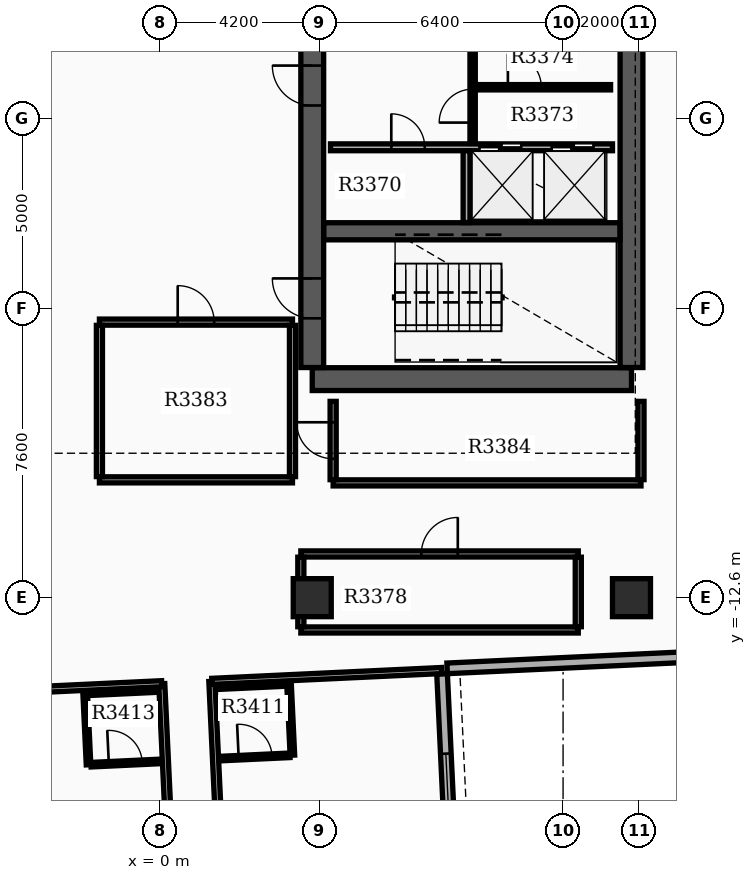
"""IFC4 building model, lengths in metres.
Left out: names, types, materials, properties, quantities, classifications, styles, units other than length and angle.
Written with IfcOpenShell. Run it as: python <this file> out.ifc"""

import sys

from ifc_helpers import new_model, si_unit, direction, frame, frame_2d, origin, origin_2d, place, context, subcontext, project, spatial, rectangle, extrude, element, fill, save


model = new_model("IFC4")
c1 = context("Model", 3, precision=1e-05, world=origin(), true_north=direction((0.0, 1.0)))
c2 = subcontext(c1, "Body", "Model", "MODEL_VIEW")
j1 = project(units=[si_unit("LENGTHUNIT", "METRE"), si_unit("PLANEANGLEUNIT", "RADIAN")], contexts=[c1])
p1 = place(None, origin())
s1 = spatial("IfcSite", under=j1, at=p1, CompositionType="ELEMENT")
p2 = place(p1, origin())
s2 = spatial("IfcBuilding", under=s1, at=p2, CompositionType="ELEMENT")
p3 = place(p2, frame((0.0, 0.0, 213.0)))
s3 = spatial("IfcBuildingStorey", under=s2, at=p3, CompositionType="ELEMENT", Elevation=213.0)
p4 = place(p3, frame((4.0, -6.85, 0.0), z_axis=(0.0, 0.0, 1.0), x_axis=(1.0, 0.0, 0.0)))
e1 = element("IfcWall", 1, at=p4, inside=s3, PredefinedType="SHEAR", context=c2, shape_type="SweptSolid", body=[
    extrude(rectangle(XDim=8.4, YDim=0.6, at=frame_2d((4.2, 0.0))), origin(), (0.0, 0.0, 1.0), 3.7),
])
p5 = place(p3, frame((4.0, -6.545, 0.0), z_axis=(0.0, 0.0, 1.0), x_axis=(0.0, 1.0, 0.0)))
e2 = element("IfcWall", 2, at=p5, inside=s3, PredefinedType="SHEAR", context=c2, shape_type="SweptSolid", body=[
    extrude(rectangle(XDim=11.19, YDim=0.6, at=frame_2d((5.595, 0.0))), origin(), (0.0, 0.0, 1.0), 3.7),
])
p6 = place(p5, frame((1.295, 0.0, 0.0)))
e3 = element("IfcOpeningElement", 3, at=p6, cuts=e2, PredefinedType="OPENING", context=c2, shape_type="SweptSolid", body=[
    extrude(rectangle(XDim=1.05, YDim=2.15, at=frame_2d((0.525, 1.075))), frame((0.0, 0.31, 0.0), z_axis=(0.0, -1.0, 0.0), x_axis=(1.0, 0.0, 0.0)), (0.0, 0.0, 1.0), 0.62),
])
p7 = place(p5, frame((6.895, 0.0, 0.0)))
e4 = element("IfcOpeningElement", 4, at=p7, cuts=e2, PredefinedType="OPENING", context=c2, shape_type="SweptSolid", body=[
    extrude(rectangle(XDim=1.05, YDim=2.15, at=frame_2d((0.525, 1.075))), frame((0.0, 0.31, 0.0), z_axis=(0.0, -1.0, 0.0), x_axis=(1.0, 0.0, 0.0)), (0.0, 0.0, 1.0), 0.62),
])
p8 = place(p3, frame((12.4, -6.545, 0.0), z_axis=(0.0, 0.0, 1.0), x_axis=(0.0, 1.0, 0.0)))
e5 = element("IfcWall", 5, at=p8, inside=s3, PredefinedType="SHEAR", context=c2, shape_type="SweptSolid", body=[
    extrude(rectangle(XDim=11.19, YDim=0.6, at=frame_2d((5.595, 0.0))), origin(), (0.0, 0.0, 1.0), 3.7),
])
p9 = place(p3, frame((4.305, -2.96, 0.0), z_axis=(0.0, 0.0, 1.0), x_axis=(1.0, 0.0, 0.0)))
e6 = element("IfcWall", 6, at=p9, inside=s3, PredefinedType="SHEAR", context=c2, shape_type="SweptSolid", body=[
    extrude(rectangle(XDim=7.79, YDim=0.45, at=frame_2d((3.895, 0.0))), origin(), (0.0, 0.0, 1.0), 3.7),
])
for number, where, z_axis, x_axis in (
    (7, (12.4, -12.6, 0.0), (0.0, 0.0, 1.0), (1.0, 0.0, 0.0)),
    (8, (4.0, -12.6, 0.0), (0.0, 0.0, 1.0), (1.0, 0.0, 0.0)),
):
    element("IfcColumn", number, at=place(p3, frame(where, z_axis=z_axis, x_axis=x_axis)), inside=s3, PredefinedType="COLUMN", context=c2, shape_type="SweptSolid", body=[
        extrude(rectangle(XDim=1.0, YDim=1.0, at=origin_2d()), origin(), (0.0, 0.0, 1.0), 3.9),
    ])
p10 = place(p3, frame((8.109, -29.291, 0.0), z_axis=(0.0, 0.0, 1.0), x_axis=(-0.047117735191, 0.998889342735, 0.0)))
e9 = element("IfcWall", 9, at=p10, inside=s3, PredefinedType="STANDARD", context=c2, shape_type="SweptSolid", body=[
    extrude(rectangle(XDim=14.7, YDim=0.28, at=frame_2d((7.35, 0.0))), origin(), (0.0, 0.0, 1.0), 3.18),
])
p11 = place(p10, frame((1.6, 0.0, 0.8)))
e10 = element("IfcOpeningElement", 10, at=p11, cuts=e9, PredefinedType="OPENING", context=c2, shape_type="SweptSolid", body=[
    extrude(rectangle(XDim=1.4, YDim=1.6, at=frame_2d((0.7, 0.8))), frame((0.0, 0.15, 0.0), z_axis=(0.0, -1.0, 0.0), x_axis=(1.0, 0.0, 0.0)), (0.0, 0.0, 1.0), 0.3),
])
p12 = place(p10, frame((4.8, 0.0, 0.8)))
e11 = element("IfcOpeningElement", 11, at=p12, cuts=e9, PredefinedType="OPENING", context=c2, shape_type="SweptSolid", body=[
    extrude(rectangle(XDim=1.4, YDim=1.6, at=frame_2d((0.7, 0.8))), frame((0.0, 0.15, 0.0), z_axis=(0.0, -1.0, 0.0), x_axis=(1.0, 0.0, 0.0)), (0.0, 0.0, 1.0), 0.3),
])
p13 = place(p10, frame((8.0, 0.0, 0.8)))
e12 = element("IfcOpeningElement", 12, at=p13, cuts=e9, PredefinedType="OPENING", context=c2, shape_type="SweptSolid", body=[
    extrude(rectangle(XDim=1.4, YDim=1.6, at=frame_2d((0.7, 0.8))), frame((0.0, 0.15, 0.0), z_axis=(0.0, -1.0, 0.0), x_axis=(1.0, 0.0, 0.0)), (0.0, 0.0, 1.0), 0.3),
])
p14 = place(p10, frame((11.2, 0.0, 0.8)))
e13 = element("IfcOpeningElement", 13, at=p14, cuts=e9, PredefinedType="OPENING", context=c2, shape_type="SweptSolid", body=[
    extrude(rectangle(XDim=1.4, YDim=1.6, at=frame_2d((0.7, 0.8))), frame((0.0, 0.15, 0.0), z_axis=(0.0, -1.0, 0.0), x_axis=(1.0, 0.0, 0.0)), (0.0, 0.0, 1.0), 0.3),
])
p15 = place(p3, frame((13.843, -14.164, 0.0), z_axis=(0.0, 0.0, 1.0), x_axis=(-0.998889082162, -0.047123258997, 0.0)))
e14 = element("IfcWall", 14, at=p15, inside=s3, PredefinedType="STANDARD", context=c2, shape_type="SweptSolid", body=[
    extrude(rectangle(XDim=6.3, YDim=0.28, at=frame_2d((3.15, 0.0))), origin(), (0.0, 0.0, 1.0), 3.18),
])
p16 = place(p3, frame((4.48, -0.75, 0.0), z_axis=(0.0, 0.0, 1.0), x_axis=(1.0, 0.0, 0.0)))
e15 = element("IfcWall", 15, at=p16, inside=s3, PredefinedType="SOLIDWALL", context=c2, shape_type="SweptSolid", body=[
    extrude(rectangle(XDim=7.42, YDim=0.18, at=frame_2d((3.71, 0.0))), origin(), (0.0, 0.0, 1.0), 3.17),
])
p17 = place(p16, frame((3.92, 0.0, 0.0)))
e16 = element("IfcOpeningElement", 16, at=p17, cuts=e15, PredefinedType="OPENING", context=c2, shape_type="SweptSolid", body=[
    extrude(rectangle(XDim=1.1, YDim=2.15, at=frame_2d((0.55, 1.075))), frame((0.0, 0.1, 0.0), z_axis=(0.0, -1.0, 0.0), x_axis=(1.0, 0.0, 0.0)), (0.0, 0.0, 1.0), 0.2),
])
p18 = place(p16, frame((5.82, 0.0, 0.0)))
e17 = element("IfcOpeningElement", 17, at=p18, cuts=e15, PredefinedType="OPENING", context=c2, shape_type="SweptSolid", body=[
    extrude(rectangle(XDim=1.1, YDim=2.15, at=frame_2d((0.55, 1.075))), frame((0.0, 0.1, 0.0), z_axis=(0.0, -1.0, 0.0), x_axis=(1.0, 0.0, 0.0)), (0.0, 0.0, 1.0), 0.2),
])
p19 = place(p16, frame((1.6, 0.0, 0.0)))
e18 = element("IfcOpeningElement", 18, at=p19, cuts=e15, PredefinedType="OPENING", context=c2, shape_type="SweptSolid", body=[
    extrude(rectangle(XDim=0.88, YDim=2.1, at=frame_2d((0.44, 1.05))), frame((0.0, 0.1, 0.0), z_axis=(0.0, -1.0, 0.0), x_axis=(1.0, 0.0, 0.0)), (0.0, 0.0, 1.0), 0.2),
])
p20 = place(p3, frame((8.06, -2.73, 0.0), z_axis=(0.0, 0.0, 1.0), x_axis=(0.0, 1.0, 0.0)))
e19 = element("IfcWall", 19, at=p20, inside=s3, PredefinedType="SOLIDWALL", context=c2, shape_type="SweptSolid", body=[
    extrude(rectangle(XDim=1.89, YDim=0.18, at=frame_2d((0.945, 0.0))), origin(), (0.0, 0.0, 1.0), 3.17),
])
p21 = place(p3, frame((8.22, -0.65, 0.0), z_axis=(0.0, 0.0, 1.0), x_axis=(0.0, 1.0, 0.0)))
e20 = element("IfcWall", 20, at=p21, inside=s3, PredefinedType="SOLIDWALL", context=c2, shape_type="SweptSolid", body=[
    extrude(rectangle(XDim=2.96, YDim=0.14, at=frame_2d((1.48, 0.0))), origin(), (0.0, 0.0, 1.0), 3.17),
])
p22 = place(p21, frame((0.55, 0.0, 0.0)))
e21 = element("IfcOpeningElement", 21, at=p22, cuts=e20, PredefinedType="OPENING", context=c2, shape_type="SweptSolid", body=[
    extrude(rectangle(XDim=0.88, YDim=2.1, at=frame_2d((0.44, 1.05))), frame((0.0, 0.08, 0.0), z_axis=(0.0, -1.0, 0.0), x_axis=(1.0, 0.0, 0.0)), (0.0, 0.0, 1.0), 0.16),
])
p23 = place(p3, frame((8.298, 0.83, 0.0), z_axis=(0.0, 0.0, 1.0), x_axis=(1.0, 0.0, 0.0)))
e22 = element("IfcWall", 22, at=p23, inside=s3, PredefinedType="PARTITIONING", context=c2, shape_type="SweptSolid", body=[
    extrude(rectangle(XDim=3.552, YDim=0.14, at=frame_2d((1.776, 0.0))), origin(), (0.0, 0.0, 1.0), 3.17),
])
p24 = place(p23, frame((0.85, 0.0, 0.0)))
e23 = element("IfcOpeningElement", 23, at=p24, cuts=e22, PredefinedType="OPENING", context=c2, shape_type="SweptSolid", body=[
    extrude(rectangle(XDim=0.88, YDim=2.1, at=frame_2d((0.44, 1.05))), frame((0.0, 0.08, 0.0), z_axis=(0.0, -1.0, 0.0), x_axis=(1.0, 0.0, 0.0)), (0.0, 0.0, 1.0), 0.16),
])
p25 = place(p3, frame((3.7, -13.45, 0.0), z_axis=(0.0, 0.0, 1.0), x_axis=(1.0, 0.0, 0.0)))
e24 = element("IfcWall", 24, at=p25, inside=s3, PredefinedType="PARTITIONING", context=c2, shape_type="SweptSolid", body=[
    extrude(rectangle(XDim=7.3, YDim=0.16, at=frame_2d((3.65, 0.0))), origin(), (0.0, 0.0, 1.0), 3.17),
])
p26 = place(p3, frame((3.7, -11.45, 0.0), z_axis=(0.0, 0.0, 1.0), x_axis=(1.0, 0.0, 0.0)))
e25 = element("IfcWall", 25, at=p26, inside=s3, PredefinedType="PARTITIONING", context=c2, shape_type="SweptSolid", body=[
    extrude(rectangle(XDim=7.3, YDim=0.16, at=frame_2d((3.65, 0.0))), origin(), (0.0, 0.0, 1.0), 3.17),
])
p27 = place(p26, frame((3.17, 0.0, 0.0)))
e26 = element("IfcOpeningElement", 26, at=p27, cuts=e25, PredefinedType="OPENING", context=c2, shape_type="SweptSolid", body=[
    extrude(rectangle(XDim=0.96, YDim=2.15, at=frame_2d((0.48, 1.075))), frame((0.0, 0.09, 0.0), z_axis=(0.0, -1.0, 0.0), x_axis=(1.0, 0.0, 0.0)), (0.0, 0.0, 1.0), 0.18),
])
for number, where, z_axis, x_axis in (
    (27, (3.7, -13.365, 0.0), (0.0, 0.0, 1.0), (0.0, 1.0, 0.0)),
    (28, (11.0, -13.365, 0.0), (0.0, 0.0, 1.0), (0.0, 1.0, 0.0)),
):
    element("IfcWall", number, at=place(p3, frame(where, z_axis=z_axis, x_axis=x_axis)), inside=s3, PredefinedType="PARTITIONING", context=c2, shape_type="SweptSolid", body=[
        extrude(rectangle(XDim=1.83, YDim=0.16, at=frame_2d((0.915, 0.0))), origin(), (0.0, 0.0, 1.0), 3.17),
    ])
p28 = place(p3, frame((-1.6, -9.5, 0.0), z_axis=(0.0, 0.0, 1.0), x_axis=(1.0, 0.0, 0.0)))
e29 = element("IfcWall", 29, at=p28, inside=s3, PredefinedType="PARTITIONING", context=c2, shape_type="SweptSolid", body=[
    extrude(rectangle(XDim=5.08, YDim=0.16, at=frame_2d((2.54, 0.0))), origin(), (0.0, 0.0, 1.0), 3.17),
])
p29 = place(p3, frame((-1.6, -5.35, 0.0), z_axis=(0.0, 0.0, 1.0), x_axis=(1.0, 0.0, 0.0)))
e30 = element("IfcWall", 30, at=p29, inside=s3, PredefinedType="PARTITIONING", context=c2, shape_type="SweptSolid", body=[
    extrude(rectangle(XDim=5.08, YDim=0.16, at=frame_2d((2.54, 0.0))), origin(), (0.0, 0.0, 1.0), 3.17),
])
p30 = place(p29, frame((2.06, 0.0, 0.0)))
e31 = element("IfcOpeningElement", 31, at=p30, cuts=e30, PredefinedType="OPENING", context=c2, shape_type="SweptSolid", body=[
    extrude(rectangle(XDim=0.96, YDim=2.15, at=frame_2d((0.48, 1.075))), frame((0.0, 0.09, 0.0), z_axis=(0.0, -1.0, 0.0), x_axis=(1.0, 0.0, 0.0)), (0.0, 0.0, 1.0), 0.18),
])
for number, where, z_axis, x_axis in (
    (32, (-1.6, -9.415, 0.0), (0.0, 0.0, 1.0), (0.0, 1.0, 0.0)),
    (33, (3.48, -9.415, 0.0), (0.0, 0.0, 1.0), (0.0, 1.0, 0.0)),
):
    element("IfcWall", number, at=place(p3, frame(where, z_axis=z_axis, x_axis=x_axis)), inside=s3, PredefinedType="PARTITIONING", context=c2, shape_type="SweptSolid", body=[
        extrude(rectangle(XDim=3.98, YDim=0.16, at=frame_2d((1.99, 0.0))), origin(), (0.0, 0.0, 1.0), 3.17),
    ])
p31 = place(p3, frame((4.55, -9.58, 0.0), z_axis=(0.0, 0.0, 1.0), x_axis=(1.0, 0.0, 0.0)))
e34 = element("IfcWall", 34, at=p31, inside=s3, PredefinedType="PARTITIONING", context=c2, shape_type="SweptSolid", body=[
    extrude(rectangle(XDim=8.1, YDim=0.16, at=frame_2d((4.05, 0.0))), origin(), (0.0, 0.0, 1.0), 3.17),
])
p32 = place(p3, frame((4.55, -9.495, 0.0), z_axis=(0.0, 0.0, 1.0), x_axis=(0.0, 1.0, 0.0)))
e35 = element("IfcWall", 35, at=p32, inside=s3, PredefinedType="PARTITIONING", context=c2, shape_type="SweptSolid", body=[
    extrude(rectangle(XDim=2.06, YDim=0.16, at=frame_2d((1.03, 0.0))), origin(), (0.0, 0.0, 1.0), 3.17),
])
p33 = place(p32, frame((0.55, 0.0, 0.0)))
e36 = element("IfcOpeningElement", 36, at=p33, cuts=e35, PredefinedType="OPENING", context=c2, shape_type="SweptSolid", body=[
    extrude(rectangle(XDim=0.96, YDim=2.15, at=frame_2d((0.48, 1.075))), frame((0.0, 0.09, 0.0), z_axis=(0.0, -1.0, 0.0), x_axis=(1.0, 0.0, 0.0)), (0.0, 0.0, 1.0), 0.18),
])
p34 = place(p3, frame((12.65, -9.495, 0.0), z_axis=(0.0, 0.0, 1.0), x_axis=(0.0, 1.0, 0.0)))
e37 = element("IfcWall", 37, at=p34, inside=s3, PredefinedType="PARTITIONING", context=c2, shape_type="SweptSolid", body=[
    extrude(rectangle(XDim=2.06, YDim=0.16, at=frame_2d((1.03, 0.0))), origin(), (0.0, 0.0, 1.0), 3.17),
])
p35 = place(p3, frame((1.359, -14.802, 0.0), z_axis=(0.0, 0.0, 1.0), x_axis=(0.04710374153, -0.99889000272, 0.0)))
e38 = element("IfcWall", 38, at=p35, inside=s3, PredefinedType="PARTITIONING", context=c2, shape_type="SweptSolid", body=[
    extrude(rectangle(XDim=14.782, YDim=0.16, at=frame_2d((7.391, 0.0))), origin(), (0.0, 0.0, 1.0), 3.17),
])
p36 = place(p35, frame((13.53, 0.0, 0.0)))
e39 = element("IfcOpeningElement", 39, at=p36, cuts=e38, PredefinedType="OPENING", context=c2, shape_type="SweptSolid", body=[
    extrude(rectangle(XDim=0.96, YDim=2.15, at=frame_2d((0.48, 1.075))), frame((0.0, 0.09, 0.0), z_axis=(0.0, -1.0, 0.0), x_axis=(1.0, 0.0, 0.0)), (0.0, 0.0, 1.0), 0.18),
])
p37 = place(p3, frame((1.359, -14.802, 0.0), z_axis=(0.0, 0.0, 1.0), x_axis=(0.998890358992, 0.047096185757, 0.0)))
e40 = element("IfcWall", 40, at=p37, inside=s3, PredefinedType="PARTITIONING", context=c2, shape_type="SweptSolid", body=[
    extrude(rectangle(XDim=6.06, YDim=0.16, at=frame_2d((3.03, 0.0))), origin(), (0.0, 0.0, 1.0), 3.17),
])
p38 = place(p3, frame((1.595, -16.833, 0.0), z_axis=(0.0, 0.0, 1.0), x_axis=(0.998890786574, 0.047087116047, 0.0)))
e41 = element("IfcWall", 41, at=p38, inside=s3, PredefinedType="PARTITIONING", context=c2, shape_type="SweptSolid", body=[
    extrude(rectangle(XDim=1.82, YDim=0.12, at=frame_2d((0.91, 0.0))), origin(), (0.0, 0.0, 1.0), 3.17),
])
p39 = place(p38, frame((0.47, 0.0, 0.0)))
e42 = element("IfcOpeningElement", 42, at=p39, cuts=e41, PredefinedType="OPENING", context=c2, shape_type="SweptSolid", body=[
    extrude(rectangle(XDim=0.88, YDim=2.1, at=frame_2d((0.44, 1.05))), frame((0.0, 0.07, 0.0), z_axis=(0.0, -1.0, 0.0), x_axis=(1.0, 0.0, 0.0)), (0.0, 0.0, 1.0), 0.14),
])
p40 = place(p3, frame((1.506, -14.956, 0.0), z_axis=(0.0, 0.0, 1.0), x_axis=(0.998884766924, 0.047214641863, 0.0)))
e43 = element("IfcWall", 43, at=p40, inside=s3, PredefinedType="PARTITIONING", context=c2, shape_type="SweptSolid", body=[
    extrude(rectangle(XDim=1.82, YDim=0.12, at=frame_2d((0.91, 0.0))), origin(), (0.0, 0.0, 1.0), 3.17),
])
p41 = place(p3, frame((3.389, -14.867, 0.0), z_axis=(0.0, 0.0, 1.0), x_axis=(0.04700985207, -0.998894425757, 0.0)))
e44 = element("IfcWall", 44, at=p41, inside=s3, PredefinedType="PARTITIONING", context=c2, shape_type="SweptSolid", body=[
    extrude(rectangle(XDim=1.88, YDim=0.12, at=frame_2d((0.94, 0.0))), origin(), (0.0, 0.0, 1.0), 3.17),
])
p42 = place(p3, frame((0.04, -14.865, 0.0), z_axis=(0.0, 0.0, 1.0), x_axis=(0.04710374153, -0.99889000272, 0.0)))
e45 = element("IfcWall", 45, at=p42, inside=s3, PredefinedType="PARTITIONING", context=c2, shape_type="SweptSolid", body=[
    extrude(rectangle(XDim=14.782, YDim=0.16, at=frame_2d((7.391, 0.0))), origin(), (0.0, 0.0, 1.0), 3.17),
])
p43 = place(p42, frame((13.53, 0.0, 0.0)))
e46 = element("IfcOpeningElement", 46, at=p43, cuts=e45, PredefinedType="OPENING", context=c2, shape_type="SweptSolid", body=[
    extrude(rectangle(XDim=0.96, YDim=2.15, at=frame_2d((0.48, 1.075))), frame((0.0, 0.09, 0.0), z_axis=(0.0, -1.0, 0.0), x_axis=(1.0, 0.0, 0.0)), (0.0, 0.0, 1.0), 0.18),
])
p44 = place(p3, frame((0.04, -14.865, 0.0), z_axis=(0.0, 0.0, 1.0), x_axis=(-0.998888462901, -0.047136383867, 0.0)))
e47 = element("IfcWall", 47, at=p44, inside=s3, PredefinedType="PARTITIONING", context=c2, shape_type="SweptSolid", body=[
    extrude(rectangle(XDim=6.06, YDim=0.16, at=frame_2d((3.03, 0.0))), origin(), (0.0, 0.0, 1.0), 3.17),
])
p45 = place(p3, frame((-1.822, -16.995, 0.0), z_axis=(0.0, 0.0, 1.0), x_axis=(0.998891083954, 0.047080807099, 0.0)))
e48 = element("IfcWall", 48, at=p45, inside=s3, PredefinedType="PARTITIONING", context=c2, shape_type="SweptSolid", body=[
    extrude(rectangle(XDim=1.82, YDim=0.12, at=frame_2d((0.91, 0.0))), origin(), (0.0, 0.0, 1.0), 3.17),
])
p46 = place(p45, frame((0.47, 0.0, 0.0)))
e49 = element("IfcOpeningElement", 49, at=p46, cuts=e48, PredefinedType="OPENING", context=c2, shape_type="SweptSolid", body=[
    extrude(rectangle(XDim=0.88, YDim=2.1, at=frame_2d((0.44, 1.05))), frame((0.0, 0.07, 0.0), z_axis=(0.0, -1.0, 0.0), x_axis=(1.0, 0.0, 0.0)), (0.0, 0.0, 1.0), 0.14),
])
p47 = place(p3, frame((-1.91, -15.117, 0.0), z_axis=(0.0, 0.0, 1.0), x_axis=(0.998890786574, 0.047087116047, 0.0)))
e50 = element("IfcWall", 50, at=p47, inside=s3, PredefinedType="PARTITIONING", context=c2, shape_type="SweptSolid", body=[
    extrude(rectangle(XDim=1.82, YDim=0.12, at=frame_2d((0.91, 0.0))), origin(), (0.0, 0.0, 1.0), 3.17),
])
p48 = place(p3, frame((-1.975, -15.12, 0.0), z_axis=(0.0, 0.0, 1.0), x_axis=(0.047139425368, -0.998888319371, 0.0)))
e51 = element("IfcWall", 51, at=p48, inside=s3, PredefinedType="PARTITIONING", context=c2, shape_type="SweptSolid", body=[
    extrude(rectangle(XDim=1.88, YDim=0.12, at=frame_2d((0.94, 0.0))), origin(), (0.0, 0.0, 1.0), 3.17),
])
p49 = place(p14, origin())
e52 = element("IfcWindow", 52, at=p49, inside=s3, PartitioningType="SINGLE_PANEL", PredefinedType="WINDOW", context=c2, shape_type="SweptSolid", body=[
    extrude(rectangle(XDim=1.4, YDim=1.6, at=frame_2d((0.7, 0.8))), frame((0.0, 0.03, 0.0), z_axis=(0.0, -1.0, 0.0), x_axis=(1.0, 0.0, 0.0)), (0.0, 0.0, 1.0), 0.06),
])
fill(e13, e52)
p50 = place(p6, origin())
e53 = element("IfcDoor", 53, at=p50, inside=s3, OperationType="SINGLE_SWING_RIGHT", PredefinedType="DOOR", context=c2, shape_type="SweptSolid", body=[
    extrude(rectangle(XDim=1.05, YDim=2.15, at=frame_2d((0.525, 1.075))), frame((0.0, 0.025, 0.0), z_axis=(0.0, -1.0, 0.0), x_axis=(1.0, 0.0, 0.0)), (0.0, 0.0, 1.0), 0.05),
])
fill(e3, e53)
p51 = place(p7, origin())
e54 = element("IfcDoor", 54, at=p51, inside=s3, OperationType="SINGLE_SWING_RIGHT", PredefinedType="DOOR", context=c2, shape_type="SweptSolid", body=[
    extrude(rectangle(XDim=1.05, YDim=2.15, at=frame_2d((0.525, 1.075))), frame((0.0, 0.025, 0.0), z_axis=(0.0, -1.0, 0.0), x_axis=(1.0, 0.0, 0.0)), (0.0, 0.0, 1.0), 0.05),
])
fill(e4, e54)
p52 = place(p17, origin())
e55 = element("IfcDoor", 55, at=p52, inside=s3, OperationType="DOUBLE_DOOR_SLIDING", PredefinedType="DOOR", context=c2, shape_type="SweptSolid", body=[
    extrude(rectangle(XDim=1.1, YDim=2.15, at=frame_2d((0.55, 1.075))), frame((0.0, 0.025, 0.0), z_axis=(0.0, -1.0, 0.0), x_axis=(1.0, 0.0, 0.0)), (0.0, 0.0, 1.0), 0.05),
])
fill(e16, e55)
p53 = place(p18, origin())
e56 = element("IfcDoor", 56, at=p53, inside=s3, OperationType="DOUBLE_DOOR_SLIDING", PredefinedType="DOOR", context=c2, shape_type="SweptSolid", body=[
    extrude(rectangle(XDim=1.1, YDim=2.15, at=frame_2d((0.55, 1.075))), frame((0.0, 0.025, 0.0), z_axis=(0.0, -1.0, 0.0), x_axis=(1.0, 0.0, 0.0)), (0.0, 0.0, 1.0), 0.05),
])
fill(e17, e56)
p54 = place(p19, origin())
e57 = element("IfcDoor", 57, at=p54, inside=s3, OperationType="SINGLE_SWING_LEFT", PredefinedType="DOOR", context=c2, shape_type="SweptSolid", body=[
    extrude(rectangle(XDim=0.88, YDim=2.1, at=frame_2d((0.44, 1.05))), frame((0.0, 0.025, 0.0), z_axis=(0.0, -1.0, 0.0), x_axis=(1.0, 0.0, 0.0)), (0.0, 0.0, 1.0), 0.05),
])
fill(e18, e57)
p55 = place(p22, origin())
e58 = element("IfcDoor", 58, at=p55, inside=s3, OperationType="SINGLE_SWING_LEFT", PredefinedType="DOOR", context=c2, shape_type="SweptSolid", body=[
    extrude(rectangle(XDim=0.88, YDim=2.1, at=frame_2d((0.44, 1.05))), frame((0.0, 0.025, 0.0), z_axis=(0.0, -1.0, 0.0), x_axis=(1.0, 0.0, 0.0)), (0.0, 0.0, 1.0), 0.05),
])
fill(e21, e58)
p56 = place(p24, origin())
e59 = element("IfcDoor", 59, at=p56, inside=s3, OperationType="SINGLE_SWING_LEFT", PredefinedType="DOOR", context=c2, shape_type="SweptSolid", body=[
    extrude(rectangle(XDim=0.88, YDim=2.1, at=frame_2d((0.44, 1.05))), frame((0.0, 0.025, 0.0), z_axis=(0.0, -1.0, 0.0), x_axis=(1.0, 0.0, 0.0)), (0.0, 0.0, 1.0), 0.05),
])
fill(e23, e59)
p57 = place(p27, origin())
e60 = element("IfcDoor", 60, at=p57, inside=s3, OperationType="SINGLE_SWING_RIGHT", PredefinedType="DOOR", context=c2, shape_type="SweptSolid", body=[
    extrude(rectangle(XDim=0.96, YDim=2.15, at=frame_2d((0.48, 1.075))), frame((0.0, 0.025, 0.0), z_axis=(0.0, -1.0, 0.0), x_axis=(1.0, 0.0, 0.0)), (0.0, 0.0, 1.0), 0.05),
])
fill(e26, e60)
p58 = place(p30, origin())
e61 = element("IfcDoor", 61, at=p58, inside=s3, OperationType="SINGLE_SWING_LEFT", PredefinedType="DOOR", context=c2, shape_type="SweptSolid", body=[
    extrude(rectangle(XDim=0.96, YDim=2.15, at=frame_2d((0.48, 1.075))), frame((0.0, 0.025, 0.0), z_axis=(0.0, -1.0, 0.0), x_axis=(1.0, 0.0, 0.0)), (0.0, 0.0, 1.0), 0.05),
])
fill(e31, e61)
p59 = place(p33, origin())
e62 = element("IfcDoor", 62, at=p59, inside=s3, OperationType="SINGLE_SWING_RIGHT", PredefinedType="DOOR", context=c2, shape_type="SweptSolid", body=[
    extrude(rectangle(XDim=0.96, YDim=2.15, at=frame_2d((0.48, 1.075))), frame((0.0, 0.025, 0.0), z_axis=(0.0, -1.0, 0.0), x_axis=(1.0, 0.0, 0.0)), (0.0, 0.0, 1.0), 0.05),
])
fill(e36, e62)
p60 = place(p39, origin())
e63 = element("IfcDoor", 63, at=p60, inside=s3, OperationType="SINGLE_SWING_LEFT", PredefinedType="DOOR", context=c2, shape_type="SweptSolid", body=[
    extrude(rectangle(XDim=0.88, YDim=2.1, at=frame_2d((0.44, 1.05))), frame((0.0, 0.025, 0.0), z_axis=(0.0, -1.0, 0.0), x_axis=(1.0, 0.0, 0.0)), (0.0, 0.0, 1.0), 0.05),
])
fill(e42, e63)
p61 = place(p46, origin())
e64 = element("IfcDoor", 64, at=p61, inside=s3, OperationType="SINGLE_SWING_LEFT", PredefinedType="DOOR", context=c2, shape_type="SweptSolid", body=[
    extrude(rectangle(XDim=0.88, YDim=2.1, at=frame_2d((0.44, 1.05))), frame((0.0, 0.025, 0.0), z_axis=(0.0, -1.0, 0.0), x_axis=(1.0, 0.0, 0.0)), (0.0, 0.0, 1.0), 0.05),
])
fill(e49, e64)
save(model, sys.argv[1])
